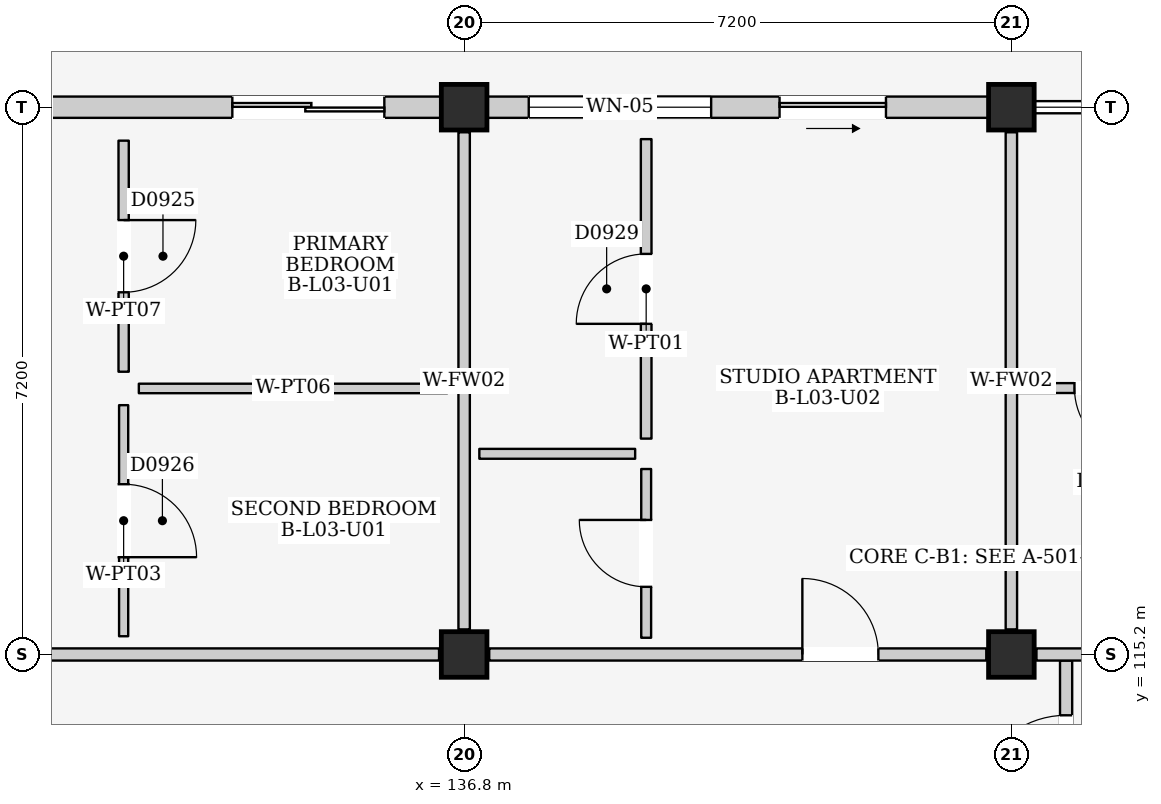
"""IFC4 building model, lengths in metres.
Left out: names, types, materials, properties, quantities, classifications, styles, units other than length and angle.
Written with IfcOpenShell. Run it as: python <this file> out.ifc"""

import sys

from ifc_helpers import new_model, si_unit, direction, frame, frame_2d, origin, origin_2d, place, context, subcontext, project, spatial, rectangle, extrude, element, fill, save


model = new_model("IFC4")
c1 = context("Model", 3, precision=1e-05, world=origin(), true_north=direction((0.0, 1.0)))
c2 = subcontext(c1, "Body", "Model", "MODEL_VIEW")
j1 = project(units=[si_unit("LENGTHUNIT", "METRE"), si_unit("PLANEANGLEUNIT", "RADIAN")], contexts=[c1])
p1 = place(None, origin())
s1 = spatial("IfcSite", under=j1, at=p1, CompositionType="ELEMENT")
p2 = place(p1, origin())
s2 = spatial("IfcBuilding", under=s1, at=p2, CompositionType="ELEMENT")
p3 = place(p2, frame((0.0, 0.0, 12.2)))
s3 = spatial("IfcBuildingStorey", under=s2, at=p3, CompositionType="ELEMENT", Elevation=12.2)
for number, where, z_axis, x_axis in (
    (1, (136.8, 115.2, 0.0), (0.0, 0.0, 1.0), (1.0, 0.0, 0.0)),
    (2, (136.8, 122.4, 0.0), (0.0, 0.0, 1.0), (1.0, 0.0, 0.0)),
    (3, (144.0, 115.2, 0.0), (0.0, 0.0, 1.0), (1.0, 0.0, 0.0)),
    (4, (144.0, 122.4, 0.0), (0.0, 0.0, 1.0), (1.0, 0.0, 0.0)),
):
    element("IfcColumn", number, at=place(p3, frame(where, z_axis=z_axis, x_axis=x_axis)), inside=s3, PredefinedType="COLUMN", context=c2, shape_type="SweptSolid", body=[
        extrude(rectangle(XDim=0.6, YDim=0.6, at=origin_2d()), origin(), (0.0, 0.0, 1.0), 3.2),
    ])
p4 = place(p3, frame((129.9, 122.4, 0.0), z_axis=(0.0, 0.0, 1.0), x_axis=(1.0, 0.0, 0.0)))
e5 = element("IfcWall", 5, at=p4, inside=s3, PredefinedType="ELEMENTEDWALL", context=c2, shape_type="SweptSolid", body=[
    extrude(rectangle(XDim=6.6, YDim=0.28, at=frame_2d((3.3, 0.0))), origin(), (0.0, 0.0, 1.0), 2.445),
])
p5 = place(p4, frame((3.85, 0.0, 0.0)))
e6 = element("IfcOpeningElement", 6, at=p5, cuts=e5, PredefinedType="OPENING", context=c2, shape_type="SweptSolid", body=[
    extrude(rectangle(XDim=2.0, YDim=2.12, at=frame_2d((1.0, 1.06))), frame((0.0, 0.155, 0.0), z_axis=(0.0, -1.0, 0.0), x_axis=(1.0, 0.0, 0.0)), (0.0, 0.0, 1.0), 0.31),
])
p6 = place(p4, frame((0.55, 0.0, 0.9)))
e7 = element("IfcOpeningElement", 7, at=p6, cuts=e5, PredefinedType="OPENING", context=c2, shape_type="SweptSolid", body=[
    extrude(rectangle(XDim=0.9, YDim=1.1, at=frame_2d((0.45, 0.55))), frame((0.0, 0.155, 0.0), z_axis=(0.0, -1.0, 0.0), x_axis=(1.0, 0.0, 0.0)), (0.0, 0.0, 1.0), 0.31),
])
p7 = place(p3, frame((137.1, 122.4, 0.0), z_axis=(0.0, 0.0, 1.0), x_axis=(1.0, 0.0, 0.0)))
e8 = element("IfcWall", 8, at=p7, inside=s3, PredefinedType="ELEMENTEDWALL", context=c2, shape_type="SweptSolid", body=[
    extrude(rectangle(XDim=6.6, YDim=0.28, at=frame_2d((3.3, 0.0))), origin(), (0.0, 0.0, 1.0), 2.445),
])
p8 = place(p7, frame((3.85, 0.0, 0.0)))
e9 = element("IfcOpeningElement", 9, at=p8, cuts=e8, PredefinedType="OPENING", context=c2, shape_type="SweptSolid", body=[
    extrude(rectangle(XDim=1.4, YDim=2.1, at=frame_2d((0.7, 1.05))), frame((0.0, 0.155, 0.0), z_axis=(0.0, -1.0, 0.0), x_axis=(1.0, 0.0, 0.0)), (0.0, 0.0, 1.0), 0.31),
])
p9 = place(p7, frame((0.55, 0.0, 0.685)))
e10 = element("IfcOpeningElement", 10, at=p9, cuts=e8, PredefinedType="OPENING", context=c2, shape_type="SweptSolid", body=[
    extrude(rectangle(XDim=2.4, YDim=1.65, at=frame_2d((1.2, 0.825))), frame((0.0, 0.155, 0.0), z_axis=(0.0, -1.0, 0.0), x_axis=(1.0, 0.0, 0.0)), (0.0, 0.0, 1.0), 0.31),
])
p10 = place(p3, frame((144.72, 111.1, 0.0), z_axis=(0.0, 0.0, 1.0), x_axis=(0.0, 1.0, 0.0)))
e11 = element("IfcWall", 11, at=p10, inside=s3, PredefinedType="PARTITIONING", context=c2, shape_type="SweptSolid", body=[
    extrude(rectangle(XDim=4.02, YDim=0.16, at=frame_2d((2.01, 0.0))), origin(), (0.0, 0.0, 1.0), 2.98),
])
p11 = place(p10, frame((2.1, 0.0, 0.0)))
e12 = element("IfcOpeningElement", 12, at=p11, cuts=e11, PredefinedType="OPENING", context=c2, shape_type="SweptSolid", body=[
    extrude(rectangle(XDim=1.2, YDim=2.2, at=frame_2d((0.6, 1.1))), frame((0.0, 0.095, 0.0), z_axis=(0.0, -1.0, 0.0), x_axis=(1.0, 0.0, 0.0)), (0.0, 0.0, 1.0), 0.19),
])
p12 = place(p3, frame((129.93, 115.2, 0.0), z_axis=(0.0, 0.0, 1.0), x_axis=(1.0, 0.0, 0.0)))
e13 = element("IfcWall", 13, at=p12, inside=s3, PredefinedType="PARTITIONING", context=c2, shape_type="SweptSolid", body=[
    extrude(rectangle(XDim=6.54, YDim=0.16, at=frame_2d((3.27, 0.0))), origin(), (0.0, 0.0, 1.0), 2.365),
])
p13 = place(p3, frame((136.8, 115.53, 0.0), z_axis=(0.0, 0.0, 1.0), x_axis=(0.0, 1.0, 0.0)))
e14 = element("IfcWall", 14, at=p13, inside=s3, PredefinedType="PARTITIONING", context=c2, shape_type="SweptSolid", body=[
    extrude(rectangle(XDim=6.54, YDim=0.15, at=frame_2d((3.27, 0.0))), origin(), (0.0, 0.0, 1.0), 2.415),
])
p14 = place(p3, frame((132.32, 118.92, 0.0), z_axis=(0.0, 0.0, 1.0), x_axis=(0.0, 1.0, 0.0)))
e15 = element("IfcWall", 15, at=p14, inside=s3, PredefinedType="PARTITIONING", context=c2, shape_type="SweptSolid", body=[
    extrude(rectangle(XDim=3.04, YDim=0.135, at=frame_2d((1.52, 0.0))), origin(), (0.0, 0.0, 1.0), 2.98),
])
p15 = place(p14, frame((1.045, 0.0, 0.0)))
e16 = element("IfcOpeningElement", 16, at=p15, cuts=e15, PredefinedType="OPENING", context=c2, shape_type="SweptSolid", body=[
    extrude(rectangle(XDim=0.95, YDim=2.15, at=frame_2d((0.475, 1.075))), frame((0.0, 0.083, 0.0), z_axis=(0.0, -1.0, 0.0), x_axis=(1.0, 0.0, 0.0)), (0.0, 0.0, 1.0), 0.165),
])
p16 = place(p3, frame((132.52, 118.7, 0.0), z_axis=(0.0, 0.0, 1.0), x_axis=(1.0, 0.0, 0.0)))
e17 = element("IfcWall", 17, at=p16, inside=s3, PredefinedType="PARTITIONING", context=c2, shape_type="SweptSolid", body=[
    extrude(rectangle(XDim=4.06, YDim=0.125, at=frame_2d((2.03, 0.0))), origin(), (0.0, 0.0, 1.0), 2.98),
])
p17 = place(p3, frame((132.32, 115.44, 0.0), z_axis=(0.0, 0.0, 1.0), x_axis=(0.0, 1.0, 0.0)))
e18 = element("IfcWall", 18, at=p17, inside=s3, PredefinedType="PARTITIONING", context=c2, shape_type="SweptSolid", body=[
    extrude(rectangle(XDim=3.04, YDim=0.12, at=frame_2d((1.52, 0.0))), origin(), (0.0, 0.0, 1.0), 2.98),
])
p18 = place(p17, frame((1.04, 0.0, 0.0)))
e19 = element("IfcOpeningElement", 19, at=p18, cuts=e18, PredefinedType="OPENING", context=c2, shape_type="SweptSolid", body=[
    extrude(rectangle(XDim=0.96, YDim=2.15, at=frame_2d((0.48, 1.075))), frame((0.0, 0.075, 0.0), z_axis=(0.0, -1.0, 0.0), x_axis=(1.0, 0.0, 0.0)), (0.0, 0.0, 1.0), 0.15),
])
p19 = place(p3, frame((137.13, 115.2, 0.0), z_axis=(0.0, 0.0, 1.0), x_axis=(1.0, 0.0, 0.0)))
e20 = element("IfcWall", 20, at=p19, inside=s3, PredefinedType="PARTITIONING", context=c2, shape_type="SweptSolid", body=[
    extrude(rectangle(XDim=6.54, YDim=0.16, at=frame_2d((3.27, 0.0))), origin(), (0.0, 0.0, 1.0), 2.365),
])
p20 = place(p19, frame((4.12, 0.0, 0.0)))
e21 = element("IfcOpeningElement", 21, at=p20, cuts=e20, PredefinedType="OPENING", context=c2, shape_type="SweptSolid", body=[
    extrude(rectangle(XDim=1.0, YDim=2.15, at=frame_2d((0.5, 1.075))), frame((0.0, 0.095, 0.0), z_axis=(0.0, -1.0, 0.0), x_axis=(1.0, 0.0, 0.0)), (0.0, 0.0, 1.0), 0.19),
])
p21 = place(p3, frame((144.0, 115.53, 0.0), z_axis=(0.0, 0.0, 1.0), x_axis=(0.0, 1.0, 0.0)))
e22 = element("IfcWall", 22, at=p21, inside=s3, PredefinedType="PARTITIONING", context=c2, shape_type="SweptSolid", body=[
    extrude(rectangle(XDim=6.54, YDim=0.15, at=frame_2d((3.27, 0.0))), origin(), (0.0, 0.0, 1.0), 2.415),
])
p22 = place(p3, frame((137.0, 117.84, 0.0), z_axis=(0.0, 0.0, 1.0), x_axis=(1.0, 0.0, 0.0)))
e23 = element("IfcWall", 23, at=p22, inside=s3, PredefinedType="PARTITIONING", context=c2, shape_type="SweptSolid", body=[
    extrude(rectangle(XDim=2.05, YDim=0.13, at=frame_2d((1.025, 0.0))), origin(), (0.0, 0.0, 1.0), 2.98),
])
p23 = place(p3, frame((139.195, 115.42, 0.0), z_axis=(0.0, 0.0, 1.0), x_axis=(0.0, 1.0, 0.0)))
e24 = element("IfcWall", 24, at=p23, inside=s3, PredefinedType="PARTITIONING", context=c2, shape_type="SweptSolid", body=[
    extrude(rectangle(XDim=2.22, YDim=0.13, at=frame_2d((1.11, 0.0))), origin(), (0.0, 0.0, 1.0), 2.98),
])
p24 = place(p23, frame((0.67, 0.0, 0.0)))
e25 = element("IfcOpeningElement", 25, at=p24, cuts=e24, PredefinedType="OPENING", context=c2, shape_type="SweptSolid", body=[
    extrude(rectangle(XDim=0.88, YDim=2.1, at=frame_2d((0.44, 1.05))), frame((0.0, 0.08, 0.0), z_axis=(0.0, -1.0, 0.0), x_axis=(1.0, 0.0, 0.0)), (0.0, 0.0, 1.0), 0.16),
])
p25 = place(p3, frame((139.195, 118.04, 0.0), z_axis=(0.0, 0.0, 1.0), x_axis=(0.0, 1.0, 0.0)))
e26 = element("IfcWall", 26, at=p25, inside=s3, PredefinedType="PARTITIONING", context=c2, shape_type="SweptSolid", body=[
    extrude(rectangle(XDim=3.94, YDim=0.14, at=frame_2d((1.97, 0.0))), origin(), (0.0, 0.0, 1.0), 2.98),
])
p26 = place(p25, frame((1.51, 0.0, 0.0)))
e27 = element("IfcOpeningElement", 27, at=p26, cuts=e26, PredefinedType="OPENING", context=c2, shape_type="SweptSolid", body=[
    extrude(rectangle(XDim=0.92, YDim=2.1, at=frame_2d((0.46, 1.05))), frame((0.0, 0.085, 0.0), z_axis=(0.0, -1.0, 0.0), x_axis=(1.0, 0.0, 0.0)), (0.0, 0.0, 1.0), 0.17),
])
p27 = place(p3, frame((144.33, 115.2, 0.0), z_axis=(0.0, 0.0, 1.0), x_axis=(1.0, 0.0, 0.0)))
e28 = element("IfcWall", 28, at=p27, inside=s3, PredefinedType="PARTITIONING", context=c2, shape_type="SweptSolid", body=[
    extrude(rectangle(XDim=6.54, YDim=0.16, at=frame_2d((3.27, 0.0))), origin(), (0.0, 0.0, 1.0), 2.365),
])
p28 = place(p3, frame((144.08, 118.705, 0.0), z_axis=(0.0, 0.0, 1.0), x_axis=(1.0, 0.0, 0.0)))
e29 = element("IfcWall", 29, at=p28, inside=s3, PredefinedType="PARTITIONING", context=c2, shape_type="SweptSolid", body=[
    extrude(rectangle(XDim=2.4, YDim=0.13, at=frame_2d((1.2, 0.0))), origin(), (0.0, 0.0, 1.0), 2.98),
])
p29 = place(p28, frame((0.75, 0.0, 0.0)))
e30 = element("IfcOpeningElement", 30, at=p29, cuts=e29, PredefinedType="OPENING", context=c2, shape_type="SweptSolid", body=[
    extrude(rectangle(XDim=0.9, YDim=2.1, at=frame_2d((0.45, 1.05))), frame((0.0, 0.08, 0.0), z_axis=(0.0, -1.0, 0.0), x_axis=(1.0, 0.0, 0.0)), (0.0, 0.0, 1.0), 0.16),
])
p30 = place(p5, frame((2.0, 0.0, 0.0), z_axis=(0.0, 0.0, 1.0), x_axis=(-1.0, 0.0, 0.0)))
e31 = element("IfcDoor", 31, at=p30, inside=s3, OperationType="DOUBLE_DOOR_SLIDING", PredefinedType="DOOR", context=c2, shape_type="SweptSolid", body=[
    extrude(rectangle(XDim=2.0, YDim=2.12, at=frame_2d((1.0, 1.06))), frame((0.0, 0.025, 0.0), z_axis=(0.0, -1.0, 0.0), x_axis=(1.0, 0.0, 0.0)), (0.0, 0.0, 1.0), 0.05),
])
fill(e6, e31)
p31 = place(p8, frame((1.4, 0.0, 0.0), z_axis=(0.0, 0.0, 1.0), x_axis=(-1.0, 0.0, 0.0)))
e32 = element("IfcDoor", 32, at=p31, inside=s3, OperationType="SLIDING_TO_RIGHT", PredefinedType="DOOR", context=c2, shape_type="SweptSolid", body=[
    extrude(rectangle(XDim=1.4, YDim=2.1, at=frame_2d((0.7, 1.05))), frame((0.0, 0.025, 0.0), z_axis=(0.0, -1.0, 0.0), x_axis=(1.0, 0.0, 0.0)), (0.0, 0.0, 1.0), 0.05),
])
fill(e9, e32)
p32 = place(p9, origin())
e33 = element("IfcWindow", 33, at=p32, inside=s3, PartitioningType="TRIPLE_PANEL_VERTICAL", PredefinedType="WINDOW", context=c2, shape_type="SweptSolid", body=[
    extrude(rectangle(XDim=2.4, YDim=1.65, at=frame_2d((1.2, 0.825))), frame((0.0, 0.03, 0.0), z_axis=(0.0, -1.0, 0.0), x_axis=(1.0, 0.0, 0.0)), (0.0, 0.0, 1.0), 0.06),
])
fill(e10, e33)
p33 = place(p11, origin())
e34 = element("IfcDoor", 34, at=p33, inside=s3, OperationType="SINGLE_SWING_LEFT", PredefinedType="DOOR", context=c2, shape_type="SweptSolid", body=[
    extrude(rectangle(XDim=1.2, YDim=2.2, at=frame_2d((0.6, 1.1))), frame((0.0, 0.025, 0.0), z_axis=(0.0, -1.0, 0.0), x_axis=(1.0, 0.0, 0.0)), (0.0, 0.0, 1.0), 0.05),
])
fill(e12, e34)
p34 = place(p15, frame((0.95, 0.0, 0.0), z_axis=(0.0, 0.0, 1.0), x_axis=(-1.0, 0.0, 0.0)))
e35 = element("IfcDoor", 35, at=p34, inside=s3, OperationType="SINGLE_SWING_LEFT", PredefinedType="DOOR", context=c2, shape_type="SweptSolid", body=[
    extrude(rectangle(XDim=0.95, YDim=2.15, at=frame_2d((0.475, 1.075))), frame((0.0, 0.025, 0.0), z_axis=(0.0, -1.0, 0.0), x_axis=(1.0, 0.0, 0.0)), (0.0, 0.0, 1.0), 0.05),
])
fill(e16, e35)
p35 = place(p18, frame((0.96, 0.0, 0.0), z_axis=(0.0, 0.0, 1.0), x_axis=(-1.0, 0.0, 0.0)))
e36 = element("IfcDoor", 36, at=p35, inside=s3, OperationType="SINGLE_SWING_RIGHT", PredefinedType="DOOR", context=c2, shape_type="SweptSolid", body=[
    extrude(rectangle(XDim=0.96, YDim=2.15, at=frame_2d((0.48, 1.075))), frame((0.0, 0.025, 0.0), z_axis=(0.0, -1.0, 0.0), x_axis=(1.0, 0.0, 0.0)), (0.0, 0.0, 1.0), 0.05),
])
fill(e19, e36)
p36 = place(p20, origin())
e37 = element("IfcDoor", 37, at=p36, inside=s3, OperationType="SINGLE_SWING_LEFT", PredefinedType="DOOR", context=c2, shape_type="SweptSolid", body=[
    extrude(rectangle(XDim=1.0, YDim=2.15, at=frame_2d((0.5, 1.075))), frame((0.0, 0.025, 0.0), z_axis=(0.0, -1.0, 0.0), x_axis=(1.0, 0.0, 0.0)), (0.0, 0.0, 1.0), 0.05),
])
fill(e21, e37)
p37 = place(p24, origin())
e38 = element("IfcDoor", 38, at=p37, inside=s3, OperationType="SINGLE_SWING_RIGHT", PredefinedType="DOOR", context=c2, shape_type="SweptSolid", body=[
    extrude(rectangle(XDim=0.88, YDim=2.1, at=frame_2d((0.44, 1.05))), frame((0.0, 0.025, 0.0), z_axis=(0.0, -1.0, 0.0), x_axis=(1.0, 0.0, 0.0)), (0.0, 0.0, 1.0), 0.05),
])
fill(e25, e38)
p38 = place(p26, origin())
e39 = element("IfcDoor", 39, at=p38, inside=s3, OperationType="SINGLE_SWING_LEFT", PredefinedType="DOOR", context=c2, shape_type="SweptSolid", body=[
    extrude(rectangle(XDim=0.92, YDim=2.1, at=frame_2d((0.46, 1.05))), frame((0.0, 0.025, 0.0), z_axis=(0.0, -1.0, 0.0), x_axis=(1.0, 0.0, 0.0)), (0.0, 0.0, 1.0), 0.05),
])
fill(e27, e39)
p39 = place(p29, frame((0.9, 0.0, 0.0), z_axis=(0.0, 0.0, 1.0), x_axis=(-1.0, 0.0, 0.0)))
e40 = element("IfcDoor", 40, at=p39, inside=s3, OperationType="SINGLE_SWING_LEFT", PredefinedType="DOOR", context=c2, shape_type="SweptSolid", body=[
    extrude(rectangle(XDim=0.9, YDim=2.1, at=frame_2d((0.45, 1.05))), frame((0.0, 0.025, 0.0), z_axis=(0.0, -1.0, 0.0), x_axis=(1.0, 0.0, 0.0)), (0.0, 0.0, 1.0), 0.05),
])
fill(e30, e40)
save(model, sys.argv[1])
